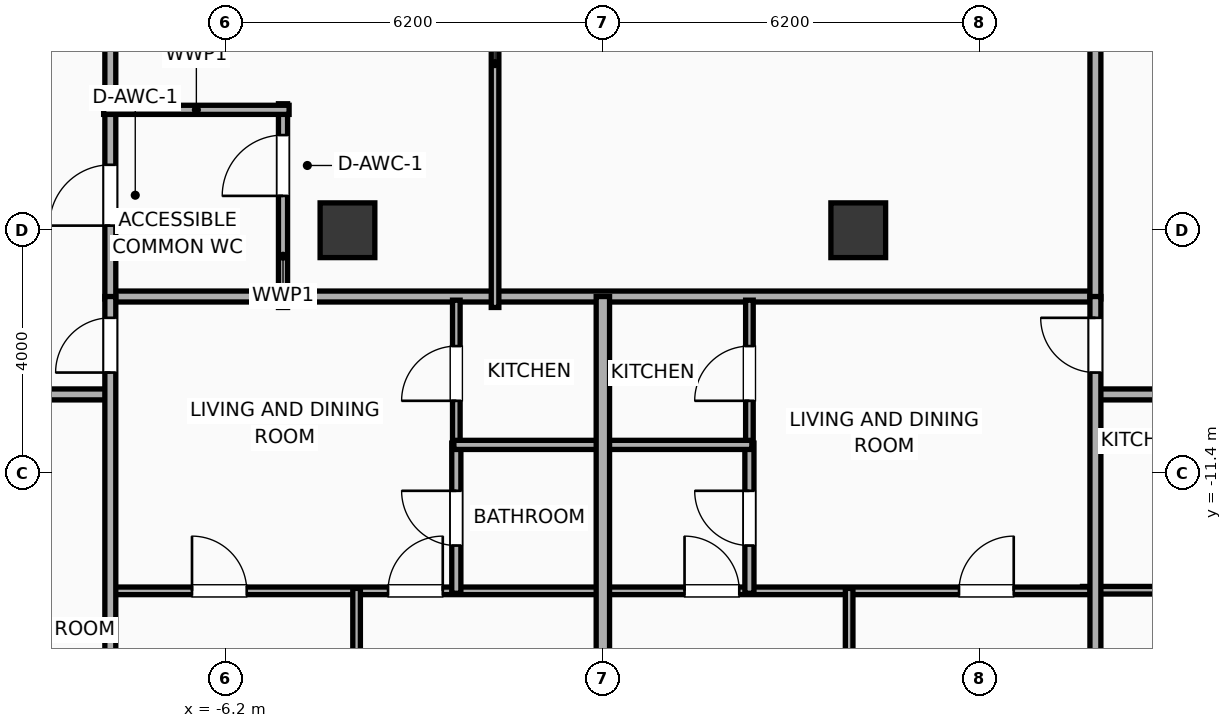
"""IFC4 building model, lengths in metres.
Left out: names, types, materials, properties, quantities, classifications, styles, units other than length and angle.
Written with IfcOpenShell. Run it as: python <this file> out.ifc"""

import sys

from ifc_helpers import new_model, si_unit, direction, frame, frame_2d, origin, origin_2d, place, context, subcontext, project, spatial, rectangle, extrude, element, fill, save


model = new_model("IFC4")
c1 = context("Model", 3, precision=1e-05, world=origin(), true_north=direction((0.0, 1.0)))
c2 = subcontext(c1, "Body", "Model", "MODEL_VIEW")
j1 = project(units=[si_unit("LENGTHUNIT", "METRE"), si_unit("PLANEANGLEUNIT", "RADIAN")], contexts=[c1])
p1 = place(None, origin())
s1 = spatial("IfcSite", under=j1, at=p1, CompositionType="ELEMENT")
p2 = place(p1, origin())
s2 = spatial("IfcBuilding", under=s1, at=p2, CompositionType="ELEMENT")
p3 = place(p2, frame((0.0, 0.0, 260.0)))
s3 = spatial("IfcBuildingStorey", under=s2, at=p3, CompositionType="ELEMENT", Elevation=260.0)
for number, where, z_axis, x_axis in (
    (1, (-4.2, -7.4, 0.0), (0.0, 0.0, 1.0), (1.0, 0.0, 0.0)),
    (2, (4.2, -7.4, 0.0), (0.0, 0.0, 1.0), (1.0, 0.0, 0.0)),
):
    element("IfcColumn", number, at=place(p3, frame(where, z_axis=z_axis, x_axis=x_axis)), inside=s3, PredefinedType="COLUMN", context=c2, shape_type="SweptSolid", body=[
        extrude(rectangle(XDim=0.9, YDim=0.9, at=origin_2d()), origin(), (0.0, 0.0, 1.0), 3.9),
    ])
p4 = place(p3, frame((-8.15, -8.49, 0.0), z_axis=(0.0, 0.0, 1.0), x_axis=(1.0, 0.0, 0.0)))
e3 = element("IfcWall", 3, at=p4, inside=s3, PredefinedType="PARTITIONING", context=c2, shape_type="SweptSolid", body=[
    extrude(rectangle(XDim=16.3, YDim=0.18, at=frame_2d((8.15, 0.0))), origin(), (0.0, 0.0, 1.0), 3.65),
])
p5 = place(p3, frame((-8.1, -8.53, 0.0), z_axis=(0.0, 0.0, 1.0), x_axis=(0.0, 1.0, 0.0)))
e4 = element("IfcWall", 4, at=p5, inside=s3, PredefinedType="PARTITIONING", context=c2, shape_type="SweptSolid", body=[
    extrude(rectangle(XDim=17.06, YDim=0.18, at=frame_2d((8.53, 0.0))), origin(), (0.0, 0.0, 1.0), 3.65),
])
p6 = place(p5, frame((1.206, 0.0, 0.0)))
e5 = element("IfcOpeningElement", 5, at=p6, cuts=e4, PredefinedType="OPENING", context=c2, shape_type="SweptSolid", body=[
    extrude(rectangle(XDim=1.0, YDim=2.05, at=frame_2d((0.5, 1.025))), frame((0.0, 0.1, 0.0), z_axis=(0.0, -1.0, 0.0), x_axis=(1.0, 0.0, 0.0)), (0.0, 0.0, 1.0), 0.2),
])
p7 = place(p5, frame((9.761, 0.0, 0.0)))
e6 = element("IfcOpeningElement", 6, at=p7, cuts=e4, PredefinedType="OPENING", context=c2, shape_type="SweptSolid", body=[
    extrude(rectangle(XDim=0.95, YDim=2.05, at=frame_2d((0.475, 1.025))), frame((0.0, 0.1, 0.0), z_axis=(0.0, -1.0, 0.0), x_axis=(1.0, 0.0, 0.0)), (0.0, 0.0, 1.0), 0.2),
])
p8 = place(p3, frame((8.1, -8.53, 0.0), z_axis=(0.0, 0.0, 1.0), x_axis=(0.0, 1.0, 0.0)))
e7 = element("IfcWall", 7, at=p8, inside=s3, PredefinedType="PARTITIONING", context=c2, shape_type="SweptSolid", body=[
    extrude(rectangle(XDim=17.06, YDim=0.18, at=frame_2d((8.53, 0.0))), origin(), (0.0, 0.0, 1.0), 3.65),
])
p9 = place(p3, frame((-5.26, -8.67, 0.0), z_axis=(0.0, 0.0, 1.0), x_axis=(0.0, 1.0, 0.0)))
e8 = element("IfcWall", 8, at=p9, inside=s3, PredefinedType="PLUMBINGWALL", context=c2, shape_type="SweptSolid", body=[
    extrude(rectangle(XDim=3.35, YDim=0.15, at=frame_2d((1.675, 0.0))), origin(), (0.0, 0.0, 1.0), 3.65),
])
p10 = place(p9, frame((1.835, 0.0, 0.0)))
e9 = element("IfcOpeningElement", 9, at=p10, cuts=e8, PredefinedType="OPENING", context=c2, shape_type="SweptSolid", body=[
    extrude(rectangle(XDim=1.0, YDim=2.05, at=frame_2d((0.5, 1.025))), frame((0.0, 0.085, 0.0), z_axis=(0.0, -1.0, 0.0), x_axis=(1.0, 0.0, 0.0)), (0.0, 0.0, 1.0), 0.17),
])
p11 = place(p3, frame((-8.21, -5.42, 0.0), z_axis=(0.0, 0.0, 1.0), x_axis=(1.0, 0.0, 0.0)))
e10 = element("IfcWall", 10, at=p11, inside=s3, PredefinedType="PLUMBINGWALL", context=c2, shape_type="SweptSolid", body=[
    extrude(rectangle(XDim=3.05, YDim=0.15, at=frame_2d((1.525, 0.0))), origin(), (0.0, 0.0, 1.0), 3.65),
])
p12 = place(p3, frame((-1.773, -8.67, 0.0), z_axis=(0.0, 0.0, 1.0), x_axis=(0.0, 1.0, 0.0)))
e11 = element("IfcWall", 11, at=p12, inside=s3, PredefinedType="PARTITIONING", context=c2, shape_type="SweptSolid", body=[
    extrude(rectangle(XDim=17.29, YDim=0.125, at=frame_2d((8.645, 0.0))), origin(), (0.0, 0.0, 1.0), 3.65),
])
p13 = place(p12, frame((8.17, 0.0, 0.0)))
e12 = element("IfcOpeningElement", 12, at=p13, cuts=e11, PredefinedType="OPENING", context=c2, shape_type="SweptSolid", body=[
    extrude(rectangle(XDim=0.95, YDim=2.05, at=frame_2d((0.475, 1.025))), frame((0.0, 0.073, 0.0), z_axis=(0.0, -1.0, 0.0), x_axis=(1.0, 0.0, 0.0)), (0.0, 0.0, 1.0), 0.145),
])
p14 = place(p3, frame((7.887, -13.32, 0.0), z_axis=(0.0, 0.0, 1.0), x_axis=(1.0, 0.0, 0.0)))
e13 = element("IfcWall", 13, at=p14, inside=s3, PredefinedType="PARTITIONING", context=c2, shape_type="SweptSolid", body=[
    extrude(rectangle(XDim=2.623, YDim=0.125, at=frame_2d((1.311, 0.0))), origin(), (0.0, 0.0, 1.0), 3.65),
])
p15 = place(p3, frame((-30.639, -10.1, 0.0), z_axis=(0.0, 0.0, 1.0), x_axis=(1.0, 0.0, 0.0)))
e14 = element("IfcWall", 14, at=p15, inside=s3, PredefinedType="PARTITIONING", context=c2, shape_type="SweptSolid", body=[
    extrude(rectangle(XDim=22.559, YDim=0.18, at=frame_2d((11.28, 0.0))), origin(), (0.0, 0.0, 1.0), 3.65),
])
p16 = place(p15, frame((2.298, 0.0, 0.0)))
e15 = element("IfcOpeningElement", 15, at=p16, cuts=e14, PredefinedType="OPENING", context=c2, shape_type="SweptSolid", body=[
    extrude(rectangle(XDim=0.9, YDim=2.05, at=frame_2d((0.45, 1.025))), frame((0.0, 0.1, 0.0), z_axis=(0.0, -1.0, 0.0), x_axis=(1.0, 0.0, 0.0)), (0.0, 0.0, 1.0), 0.2),
])
p17 = place(p15, frame((8.823, 0.0, 0.0)))
e16 = element("IfcOpeningElement", 16, at=p17, cuts=e14, PredefinedType="OPENING", context=c2, shape_type="SweptSolid", body=[
    extrude(rectangle(XDim=1.15, YDim=2.05, at=frame_2d((0.575, 1.025))), frame((0.0, 0.1, 0.0), z_axis=(0.0, -1.0, 0.0), x_axis=(1.0, 0.0, 0.0)), (0.0, 0.0, 1.0), 0.2),
])
p18 = place(p15, frame((13.738, 0.0, 0.0)))
e17 = element("IfcOpeningElement", 17, at=p18, cuts=e14, PredefinedType="OPENING", context=c2, shape_type="SweptSolid", body=[
    extrude(rectangle(XDim=0.9, YDim=2.05, at=frame_2d((0.45, 1.025))), frame((0.0, 0.1, 0.0), z_axis=(0.0, -1.0, 0.0), x_axis=(1.0, 0.0, 0.0)), (0.0, 0.0, 1.0), 0.2),
])
p19 = place(p15, frame((20.27, 0.0, 0.0)))
e18 = element("IfcOpeningElement", 18, at=p19, cuts=e14, PredefinedType="OPENING", context=c2, shape_type="SweptSolid", body=[
    extrude(rectangle(XDim=1.15, YDim=2.05, at=frame_2d((0.575, 1.025))), frame((0.0, 0.1, 0.0), z_axis=(0.0, -1.0, 0.0), x_axis=(1.0, 0.0, 0.0)), (0.0, 0.0, 1.0), 0.2),
])
p20 = place(p3, frame((8.08, -10.1, 0.0), z_axis=(0.0, 0.0, 1.0), x_axis=(1.0, 0.0, 0.0)))
e19 = element("IfcWall", 19, at=p20, inside=s3, PredefinedType="PARTITIONING", context=c2, shape_type="SweptSolid", body=[
    extrude(rectangle(XDim=15.236, YDim=0.18, at=frame_2d((7.618, 0.0))), origin(), (0.0, 0.0, 1.0), 3.65),
])
p21 = place(p20, frame((3.4, 0.0, 0.0)))
e20 = element("IfcOpeningElement", 20, at=p21, cuts=e19, PredefinedType="OPENING", context=c2, shape_type="SweptSolid", body=[
    extrude(rectangle(XDim=1.15, YDim=2.05, at=frame_2d((0.575, 1.025))), frame((0.0, 0.1, 0.0), z_axis=(0.0, -1.0, 0.0), x_axis=(1.0, 0.0, 0.0)), (0.0, 0.0, 1.0), 0.2),
])
p22 = place(p20, frame((11.05, 0.0, 0.0)))
e21 = element("IfcOpeningElement", 21, at=p22, cuts=e19, PredefinedType="OPENING", context=c2, shape_type="SweptSolid", body=[
    extrude(rectangle(XDim=1.15, YDim=2.05, at=frame_2d((0.575, 1.025))), frame((0.0, 0.1, 0.0), z_axis=(0.0, -1.0, 0.0), x_axis=(1.0, 0.0, 0.0)), (0.0, 0.0, 1.0), 0.2),
])
p23 = place(p3, frame((-8.08, -13.33, 0.0), z_axis=(0.0, 0.0, 1.0), x_axis=(1.0, 0.0, 0.0)))
e22 = element("IfcWall", 22, at=p23, inside=s3, PredefinedType="PARTITIONING", context=c2, shape_type="SweptSolid", body=[
    extrude(rectangle(XDim=8.06, YDim=0.125, at=frame_2d((4.03, 0.0))), origin(), (0.0, 0.0, 1.0), 3.65),
])
p24 = place(p23, frame((1.323, 0.0, 0.0)))
e23 = element("IfcOpeningElement", 23, at=p24, cuts=e22, PredefinedType="OPENING", context=c2, shape_type="SweptSolid", body=[
    extrude(rectangle(XDim=0.9, YDim=2.05, at=frame_2d((0.45, 1.025))), frame((0.0, 0.073, 0.0), z_axis=(0.0, -1.0, 0.0), x_axis=(1.0, 0.0, 0.0)), (0.0, 0.0, 1.0), 0.145),
])
p25 = place(p23, frame((4.547, 0.0, 0.0)))
e24 = element("IfcOpeningElement", 24, at=p25, cuts=e22, PredefinedType="OPENING", context=c2, shape_type="SweptSolid", body=[
    extrude(rectangle(XDim=0.9, YDim=2.05, at=frame_2d((0.45, 1.025))), frame((0.0, 0.073, 0.0), z_axis=(0.0, -1.0, 0.0), x_axis=(1.0, 0.0, 0.0)), (0.0, 0.0, 1.0), 0.145),
])
p26 = place(p3, frame((-2.41, -10.96, 0.0), z_axis=(0.0, 0.0, 1.0), x_axis=(0.0, 1.0, 0.0)))
e25 = element("IfcWall", 25, at=p26, inside=s3, PredefinedType="PARTITIONING", context=c2, shape_type="SweptSolid", body=[
    extrude(rectangle(XDim=2.41, YDim=0.125, at=frame_2d((1.205, 0.0))), origin(), (0.0, 0.0, 1.0), 3.65),
])
p27 = place(p26, frame((0.755, 0.0, 0.0)))
e26 = element("IfcOpeningElement", 26, at=p27, cuts=e25, PredefinedType="OPENING", context=c2, shape_type="SweptSolid", body=[
    extrude(rectangle(XDim=0.9, YDim=2.05, at=frame_2d((0.45, 1.025))), frame((0.0, 0.073, 0.0), z_axis=(0.0, -1.0, 0.0), x_axis=(1.0, 0.0, 0.0)), (0.0, 0.0, 1.0), 0.145),
])
p28 = place(p3, frame((-2.41, -13.37, 0.0), z_axis=(0.0, 0.0, 1.0), x_axis=(0.0, 1.0, 0.0)))
e27 = element("IfcWall", 27, at=p28, inside=s3, PredefinedType="PLUMBINGWALL", context=c2, shape_type="SweptSolid", body=[
    extrude(rectangle(XDim=2.47, YDim=0.15, at=frame_2d((1.235, 0.0))), origin(), (0.0, 0.0, 1.0), 3.65),
])
p29 = place(p28, frame((0.785, 0.0, 0.0)))
e28 = element("IfcOpeningElement", 28, at=p29, cuts=e27, PredefinedType="OPENING", context=c2, shape_type="SweptSolid", body=[
    extrude(rectangle(XDim=0.9, YDim=2.05, at=frame_2d((0.45, 1.025))), frame((0.0, 0.085, 0.0), z_axis=(0.0, -1.0, 0.0), x_axis=(1.0, 0.0, 0.0)), (0.0, 0.0, 1.0), 0.17),
])
p30 = place(p3, frame((-2.45, -10.93, 0.0), z_axis=(0.0, 0.0, 1.0), x_axis=(1.0, 0.0, 0.0)))
e29 = element("IfcWall", 29, at=p30, inside=s3, PredefinedType="PLUMBINGWALL", context=c2, shape_type="SweptSolid", body=[
    extrude(rectangle(XDim=2.43, YDim=0.15, at=frame_2d((1.215, 0.0))), origin(), (0.0, 0.0, 1.0), 3.65),
])
p31 = place(p3, frame((-4.05, -18.58, 0.0), z_axis=(0.0, 0.0, 1.0), x_axis=(0.0, 1.0, 0.0)))
e30 = element("IfcWall", 30, at=p31, inside=s3, PredefinedType="PARTITIONING", context=c2, shape_type="SweptSolid", body=[
    extrude(rectangle(XDim=5.29, YDim=0.125, at=frame_2d((2.645, 0.0))), origin(), (0.0, 0.0, 1.0), 3.65),
])
p32 = place(p3, frame((-8.1, -18.155, 0.0), z_axis=(0.0, 0.0, 1.0), x_axis=(0.0, 1.0, 0.0)))
e31 = element("IfcWall", 31, at=p32, inside=s3, PredefinedType="PARTITIONING", context=c2, shape_type="SweptSolid", body=[
    extrude(rectangle(XDim=9.665, YDim=0.18, at=frame_2d((4.832, 0.0))), origin(), (0.0, 0.0, 1.0), 3.65),
])
p33 = place(p32, frame((8.414, 0.0, 0.0)))
e32 = element("IfcOpeningElement", 32, at=p33, cuts=e31, PredefinedType="OPENING", context=c2, shape_type="SweptSolid", body=[
    extrude(rectangle(XDim=0.9, YDim=2.05, at=frame_2d((0.45, 1.025))), frame((0.0, 0.1, 0.0), z_axis=(0.0, -1.0, 0.0), x_axis=(1.0, 0.0, 0.0)), (0.0, 0.0, 1.0), 0.2),
])
p34 = place(p3, frame((0.02, -13.33, 0.0), z_axis=(0.0, 0.0, 1.0), x_axis=(1.0, 0.0, 0.0)))
e33 = element("IfcWall", 33, at=p34, inside=s3, PredefinedType="PARTITIONING", context=c2, shape_type="SweptSolid", body=[
    extrude(rectangle(XDim=7.992, YDim=0.125, at=frame_2d((3.996, 0.0))), origin(), (0.0, 0.0, 1.0), 3.65),
])
p35 = place(p34, frame((1.323, 0.0, 0.0)))
e34 = element("IfcOpeningElement", 34, at=p35, cuts=e33, PredefinedType="OPENING", context=c2, shape_type="SweptSolid", body=[
    extrude(rectangle(XDim=0.9, YDim=2.05, at=frame_2d((0.45, 1.025))), frame((0.0, 0.073, 0.0), z_axis=(0.0, -1.0, 0.0), x_axis=(1.0, 0.0, 0.0)), (0.0, 0.0, 1.0), 0.145),
])
p36 = place(p34, frame((5.837, 0.0, 0.0)))
e35 = element("IfcOpeningElement", 35, at=p36, cuts=e33, PredefinedType="OPENING", context=c2, shape_type="SweptSolid", body=[
    extrude(rectangle(XDim=0.9, YDim=2.05, at=frame_2d((0.45, 1.025))), frame((0.0, 0.073, 0.0), z_axis=(0.0, -1.0, 0.0), x_axis=(1.0, 0.0, 0.0)), (0.0, 0.0, 1.0), 0.145),
])
p37 = place(p3, frame((2.41, -10.96, 0.0), z_axis=(0.0, 0.0, 1.0), x_axis=(0.0, 1.0, 0.0)))
e36 = element("IfcWall", 36, at=p37, inside=s3, PredefinedType="PARTITIONING", context=c2, shape_type="SweptSolid", body=[
    extrude(rectangle(XDim=2.41, YDim=0.125, at=frame_2d((1.205, 0.0))), origin(), (0.0, 0.0, 1.0), 2.54),
])
p38 = place(p37, frame((0.755, 0.0, 0.0)))
e37 = element("IfcOpeningElement", 37, at=p38, cuts=e36, PredefinedType="OPENING", context=c2, shape_type="SweptSolid", body=[
    extrude(rectangle(XDim=0.9, YDim=2.05, at=frame_2d((0.45, 1.025))), frame((0.0, 0.073, 0.0), z_axis=(0.0, -1.0, 0.0), x_axis=(1.0, 0.0, 0.0)), (0.0, 0.0, 1.0), 0.145),
])
p39 = place(p3, frame((2.41, -13.37, 0.0), z_axis=(0.0, 0.0, 1.0), x_axis=(0.0, 1.0, 0.0)))
e38 = element("IfcWall", 38, at=p39, inside=s3, PredefinedType="PLUMBINGWALL", context=c2, shape_type="SweptSolid", body=[
    extrude(rectangle(XDim=2.47, YDim=0.15, at=frame_2d((1.235, 0.0))), origin(), (0.0, 0.0, 1.0), 2.54),
])
p40 = place(p39, frame((0.785, 0.0, 0.0)))
e39 = element("IfcOpeningElement", 39, at=p40, cuts=e38, PredefinedType="OPENING", context=c2, shape_type="SweptSolid", body=[
    extrude(rectangle(XDim=0.9, YDim=2.05, at=frame_2d((0.45, 1.025))), frame((0.0, 0.085, 0.0), z_axis=(0.0, -1.0, 0.0), x_axis=(1.0, 0.0, 0.0)), (0.0, 0.0, 1.0), 0.17),
])
p41 = place(p3, frame((0.02, -10.93, 0.0), z_axis=(0.0, 0.0, 1.0), x_axis=(1.0, 0.0, 0.0)))
e40 = element("IfcWall", 40, at=p41, inside=s3, PredefinedType="PLUMBINGWALL", context=c2, shape_type="SweptSolid", body=[
    extrude(rectangle(XDim=2.43, YDim=0.15, at=frame_2d((1.215, 0.0))), origin(), (0.0, 0.0, 1.0), 3.65),
])
p42 = place(p3, frame((4.05, -19.432, 0.0), z_axis=(0.0, 0.0, 1.0), x_axis=(0.0, 1.0, 0.0)))
e41 = element("IfcWall", 41, at=p42, inside=s3, PredefinedType="PARTITIONING", context=c2, shape_type="SweptSolid", body=[
    extrude(rectangle(XDim=6.142, YDim=0.125, at=frame_2d((3.071, 0.0))), origin(), (0.0, 0.0, 1.0), 3.65),
])
p43 = place(p3, frame((8.1, -19.857, 0.0), z_axis=(0.0, 0.0, 1.0), x_axis=(0.0, 1.0, 0.0)))
e42 = element("IfcWall", 42, at=p43, inside=s3, PredefinedType="PARTITIONING", context=c2, shape_type="SweptSolid", body=[
    extrude(rectangle(XDim=11.367, YDim=0.18, at=frame_2d((5.684, 0.0))), origin(), (0.0, 0.0, 1.0), 3.65),
])
p44 = place(p43, frame((10.117, 0.0, 0.0)))
e43 = element("IfcOpeningElement", 43, at=p44, cuts=e42, PredefinedType="OPENING", context=c2, shape_type="SweptSolid", body=[
    extrude(rectangle(XDim=0.9, YDim=2.05, at=frame_2d((0.45, 1.025))), frame((0.0, 0.1, 0.0), z_axis=(0.0, -1.0, 0.0), x_axis=(1.0, 0.0, 0.0)), (0.0, 0.0, 1.0), 0.2),
])
p45 = place(p3, frame((0.0, -19.006, 0.0), z_axis=(0.0, 0.0, 1.0), x_axis=(0.0, 1.0, 0.0)))
e44 = element("IfcWall", 44, at=p45, inside=s3, PredefinedType="PARTITIONING", context=c2, shape_type="SweptSolid", body=[
    extrude(rectangle(XDim=10.516, YDim=0.22, at=frame_2d((5.258, 0.0))), origin(), (0.0, 0.0, 1.0), 2.54),
])
p46 = place(p6, origin())
e45 = element("IfcDoor", 45, at=p46, inside=s3, OperationType="SINGLE_SWING_LEFT", PredefinedType="DOOR", context=c2, shape_type="SweptSolid", body=[
    extrude(rectangle(XDim=1.0, YDim=2.05, at=frame_2d((0.5, 1.025))), frame((0.0, 0.025, 0.0), z_axis=(0.0, -1.0, 0.0), x_axis=(1.0, 0.0, 0.0)), (0.0, 0.0, 1.0), 0.05),
])
fill(e5, e45)
p47 = place(p10, origin())
e46 = element("IfcDoor", 46, at=p47, inside=s3, OperationType="SINGLE_SWING_LEFT", PredefinedType="DOOR", context=c2, shape_type="SweptSolid", body=[
    extrude(rectangle(XDim=1.0, YDim=2.05, at=frame_2d((0.5, 1.025))), frame((0.0, 0.025, 0.0), z_axis=(0.0, -1.0, 0.0), x_axis=(1.0, 0.0, 0.0)), (0.0, 0.0, 1.0), 0.05),
])
fill(e9, e46)
p48 = place(p24, origin())
e47 = element("IfcDoor", 47, at=p48, inside=s3, OperationType="SINGLE_SWING_LEFT", PredefinedType="DOOR", context=c2, shape_type="SweptSolid", body=[
    extrude(rectangle(XDim=0.9, YDim=2.05, at=frame_2d((0.45, 1.025))), frame((0.0, 0.025, 0.0), z_axis=(0.0, -1.0, 0.0), x_axis=(1.0, 0.0, 0.0)), (0.0, 0.0, 1.0), 0.05),
])
fill(e23, e47)
p49 = place(p25, origin())
e48 = element("IfcDoor", 48, at=p49, inside=s3, OperationType="SINGLE_SWING_RIGHT", PredefinedType="DOOR", context=c2, shape_type="SweptSolid", body=[
    extrude(rectangle(XDim=0.9, YDim=2.05, at=frame_2d((0.45, 1.025))), frame((0.0, 0.025, 0.0), z_axis=(0.0, -1.0, 0.0), x_axis=(1.0, 0.0, 0.0)), (0.0, 0.0, 1.0), 0.05),
])
fill(e24, e48)
p50 = place(p27, origin())
e49 = element("IfcDoor", 49, at=p50, inside=s3, OperationType="SINGLE_SWING_LEFT", PredefinedType="DOOR", context=c2, shape_type="SweptSolid", body=[
    extrude(rectangle(XDim=0.9, YDim=2.05, at=frame_2d((0.45, 1.025))), frame((0.0, 0.025, 0.0), z_axis=(0.0, -1.0, 0.0), x_axis=(1.0, 0.0, 0.0)), (0.0, 0.0, 1.0), 0.05),
])
fill(e26, e49)
p51 = place(p29, origin())
e50 = element("IfcDoor", 50, at=p51, inside=s3, OperationType="SINGLE_SWING_RIGHT", PredefinedType="DOOR", context=c2, shape_type="SweptSolid", body=[
    extrude(rectangle(XDim=0.9, YDim=2.05, at=frame_2d((0.45, 1.025))), frame((0.0, 0.025, 0.0), z_axis=(0.0, -1.0, 0.0), x_axis=(1.0, 0.0, 0.0)), (0.0, 0.0, 1.0), 0.05),
])
fill(e28, e50)
p52 = place(p33, origin())
e51 = element("IfcDoor", 51, at=p52, inside=s3, OperationType="SINGLE_SWING_LEFT", PredefinedType="DOOR", context=c2, shape_type="SweptSolid", body=[
    extrude(rectangle(XDim=0.9, YDim=2.05, at=frame_2d((0.45, 1.025))), frame((0.0, 0.025, 0.0), z_axis=(0.0, -1.0, 0.0), x_axis=(1.0, 0.0, 0.0)), (0.0, 0.0, 1.0), 0.05),
])
fill(e32, e51)
p53 = place(p35, origin())
e52 = element("IfcDoor", 52, at=p53, inside=s3, OperationType="SINGLE_SWING_LEFT", PredefinedType="DOOR", context=c2, shape_type="SweptSolid", body=[
    extrude(rectangle(XDim=0.9, YDim=2.05, at=frame_2d((0.45, 1.025))), frame((0.0, 0.025, 0.0), z_axis=(0.0, -1.0, 0.0), x_axis=(1.0, 0.0, 0.0)), (0.0, 0.0, 1.0), 0.05),
])
fill(e34, e52)
p54 = place(p36, origin())
e53 = element("IfcDoor", 53, at=p54, inside=s3, OperationType="SINGLE_SWING_RIGHT", PredefinedType="DOOR", context=c2, shape_type="SweptSolid", body=[
    extrude(rectangle(XDim=0.9, YDim=2.05, at=frame_2d((0.45, 1.025))), frame((0.0, 0.025, 0.0), z_axis=(0.0, -1.0, 0.0), x_axis=(1.0, 0.0, 0.0)), (0.0, 0.0, 1.0), 0.05),
])
fill(e35, e53)
p55 = place(p38, origin())
e54 = element("IfcDoor", 54, at=p55, inside=s3, OperationType="SINGLE_SWING_LEFT", PredefinedType="DOOR", context=c2, shape_type="SweptSolid", body=[
    extrude(rectangle(XDim=0.9, YDim=2.05, at=frame_2d((0.45, 1.025))), frame((0.0, 0.025, 0.0), z_axis=(0.0, -1.0, 0.0), x_axis=(1.0, 0.0, 0.0)), (0.0, 0.0, 1.0), 0.05),
])
fill(e37, e54)
p56 = place(p40, origin())
e55 = element("IfcDoor", 55, at=p56, inside=s3, OperationType="SINGLE_SWING_RIGHT", PredefinedType="DOOR", context=c2, shape_type="SweptSolid", body=[
    extrude(rectangle(XDim=0.9, YDim=2.05, at=frame_2d((0.45, 1.025))), frame((0.0, 0.025, 0.0), z_axis=(0.0, -1.0, 0.0), x_axis=(1.0, 0.0, 0.0)), (0.0, 0.0, 1.0), 0.05),
])
fill(e39, e55)
p57 = place(p44, origin())
e56 = element("IfcDoor", 56, at=p57, inside=s3, OperationType="SINGLE_SWING_RIGHT", PredefinedType="DOOR", context=c2, shape_type="SweptSolid", body=[
    extrude(rectangle(XDim=0.9, YDim=2.05, at=frame_2d((0.45, 1.025))), frame((0.0, 0.025, 0.0), z_axis=(0.0, -1.0, 0.0), x_axis=(1.0, 0.0, 0.0)), (0.0, 0.0, 1.0), 0.05),
])
fill(e43, e56)
save(model, sys.argv[1])
